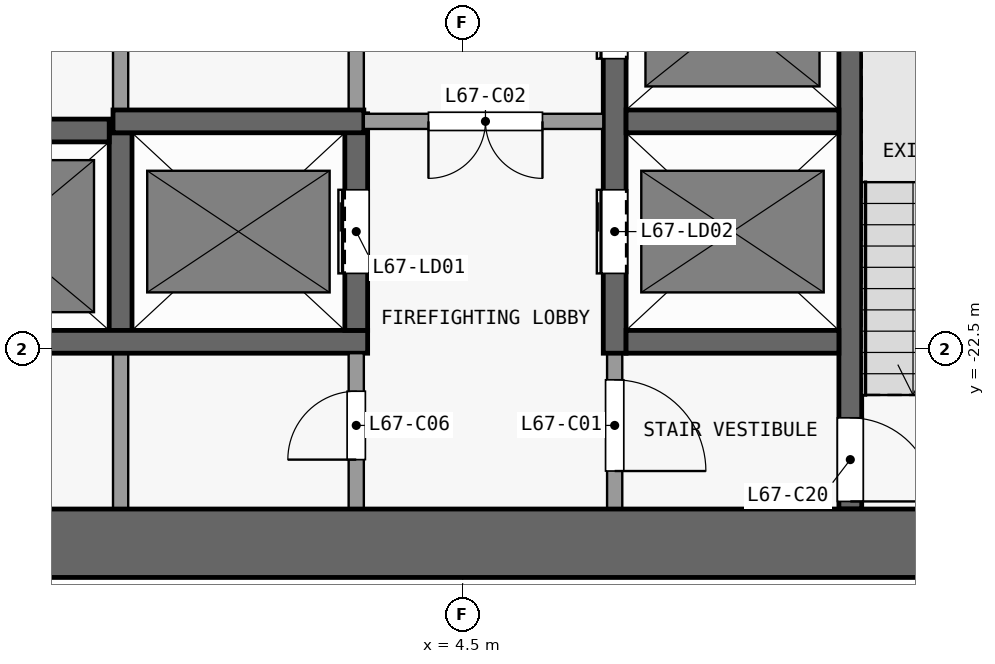
"""IFC4 building model, lengths in metres.
Left out: names, types, materials, properties, quantities, classifications, styles, units other than length and angle.
Written with IfcOpenShell. Run it as: python <this file> out.ifc"""

import sys

from ifc_helpers import new_model, si_unit, direction, frame, frame_2d, origin, place, context, subcontext, project, spatial, rectangle, extrude, element, fill, save


model = new_model("IFC4")
c1 = context("Model", 3, precision=1e-05, world=origin(), true_north=direction((0.0, 1.0)))
c2 = subcontext(c1, "Body", "Model", "MODEL_VIEW")
j1 = project(units=[si_unit("LENGTHUNIT", "METRE"), si_unit("PLANEANGLEUNIT", "RADIAN")], contexts=[c1])
p1 = place(None, origin())
s1 = spatial("IfcSite", under=j1, at=p1, CompositionType="ELEMENT")
p2 = place(p1, origin())
s2 = spatial("IfcBuilding", under=s1, at=p2, CompositionType="ELEMENT")
p3 = place(p2, frame((0.0, 0.0, 266.3)))
s3 = spatial("IfcBuildingStorey", under=s2, at=p3, CompositionType="ELEMENT", Elevation=266.3)
p4 = place(p3, frame((-13.1, -25.05, 0.0), z_axis=(0.0, 0.0, 1.0), x_axis=(1.0, 0.0, 0.0)))
e1 = element("IfcWall", 1, at=p4, inside=s3, PredefinedType="SHEAR", context=c2, shape_type="SweptSolid", body=[
    extrude(rectangle(XDim=26.2, YDim=0.9, at=frame_2d((13.1, 0.0))), origin(), (0.0, 0.0, 1.0), 3.3),
])
p5 = place(p3, frame((-3.25, -22.4, 0.0), z_axis=(0.0, 0.0, 1.0), x_axis=(1.0, 0.0, 0.0)))
e2 = element("IfcWall", 2, at=p5, inside=s3, PredefinedType="SHEAR", context=c2, shape_type="SweptSolid", body=[
    extrude(rectangle(XDim=6.5, YDim=0.3, at=frame_2d((3.25, 0.0))), origin(), (0.0, 0.0, 1.0), 3.3),
])
p6 = place(p3, frame((6.65, -22.4, 0.0), z_axis=(0.0, 0.0, 1.0), x_axis=(1.0, 0.0, 0.0)))
e3 = element("IfcWall", 3, at=p6, inside=s3, PredefinedType="SHEAR", context=c2, shape_type="SweptSolid", body=[
    extrude(rectangle(XDim=2.8, YDim=0.3, at=frame_2d((1.4, 0.0))), origin(), (0.0, 0.0, 1.0), 3.3),
])
p7 = place(p3, frame((-3.175, -19.62, 0.0), z_axis=(0.0, 0.0, 1.0), x_axis=(1.0, 0.0, 0.0)))
e4 = element("IfcWall", 4, at=p7, inside=s3, PredefinedType="SHEAR", context=c2, shape_type="SweptSolid", body=[
    extrude(rectangle(XDim=3.025, YDim=0.3, at=frame_2d((1.513, 0.0))), origin(), (0.0, 0.0, 1.0), 3.3),
])
p8 = place(p3, frame((-0.1, -19.5, 0.0), z_axis=(0.0, 0.0, 1.0), x_axis=(1.0, 0.0, 0.0)))
e5 = element("IfcWall", 5, at=p8, inside=s3, PredefinedType="SHEAR", context=c2, shape_type="SweptSolid", body=[
    extrude(rectangle(XDim=3.3, YDim=0.3, at=frame_2d((1.65, 0.0))), origin(), (0.0, 0.0, 1.0), 3.3),
])
p9 = place(p3, frame((6.35, -19.5, 0.0), z_axis=(0.0, 0.0, 1.0), x_axis=(-1.0, 0.0, 0.0)))
e6 = element("IfcWall", 6, at=p9, inside=s3, PredefinedType="PARTITIONING", context=c2, shape_type="SweptSolid", body=[
    extrude(rectangle(XDim=3.15, YDim=0.2, at=frame_2d((1.575, 0.0))), origin(), (0.0, 0.0, 1.0), 3.3),
])
p10 = place(p9, frame((0.8, 0.0, 0.0)))
e7 = element("IfcOpeningElement", 7, at=p10, cuts=e6, PredefinedType="OPENING", context=c2, shape_type="SweptSolid", body=[
    extrude(rectangle(XDim=1.5, YDim=2.1, at=frame_2d((0.75, 1.05))), frame((0.0, 0.11, 0.0), z_axis=(0.0, -1.0, 0.0), x_axis=(1.0, 0.0, 0.0)), (0.0, 0.0, 1.0), 0.22),
])
p11 = place(p3, frame((6.65, -19.5, 0.0), z_axis=(0.0, 0.0, 1.0), x_axis=(1.0, 0.0, 0.0)))
e8 = element("IfcWall", 8, at=p11, inside=s3, PredefinedType="SHEAR", context=c2, shape_type="SweptSolid", body=[
    extrude(rectangle(XDim=2.8, YDim=0.3, at=frame_2d((1.4, 0.0))), origin(), (0.0, 0.0, 1.0), 3.3),
])
p12 = place(p3, frame((0.0, -24.6, 0.0), z_axis=(0.0, 0.0, 1.0), x_axis=(0.0, 1.0, 0.0)))
e9 = element("IfcWall", 9, at=p12, inside=s3, PredefinedType="PARTITIONING", context=c2, shape_type="SweptSolid", body=[
    extrude(rectangle(XDim=2.05, YDim=0.2, at=frame_2d((1.025, 0.0))), origin(), (0.0, 0.0, 1.0), 3.3),
])
p13 = place(p3, frame((0.0, -22.25, 0.0), z_axis=(0.0, 0.0, 1.0), x_axis=(0.0, 1.0, 0.0)))
e10 = element("IfcWall", 10, at=p13, inside=s3, PredefinedType="SHEAR", context=c2, shape_type="SweptSolid", body=[
    extrude(rectangle(XDim=2.6, YDim=0.3, at=frame_2d((1.3, 0.0))), origin(), (0.0, 0.0, 1.0), 3.3),
])
p14 = place(p3, frame((0.0, -19.35, 0.0), z_axis=(0.0, 0.0, 1.0), x_axis=(0.0, 1.0, 0.0)))
e11 = element("IfcWall", 11, at=p14, inside=s3, PredefinedType="PARTITIONING", context=c2, shape_type="SweptSolid", body=[
    extrude(rectangle(XDim=8.2, YDim=0.2, at=frame_2d((4.1, 0.0))), origin(), (0.0, 0.0, 1.0), 3.3),
])
p15 = place(p3, frame((3.1, -24.6, 0.0), z_axis=(0.0, 0.0, 1.0), x_axis=(0.0, 1.0, 0.0)))
e12 = element("IfcWall", 12, at=p15, inside=s3, PredefinedType="PARTITIONING", context=c2, shape_type="SweptSolid", body=[
    extrude(rectangle(XDim=2.05, YDim=0.2, at=frame_2d((1.025, 0.0))), origin(), (0.0, 0.0, 1.0), 3.3),
])
p16 = place(p15, frame((0.65, 0.0, 0.0)))
e13 = element("IfcOpeningElement", 13, at=p16, cuts=e12, PredefinedType="OPENING", context=c2, shape_type="SweptSolid", body=[
    extrude(rectangle(XDim=0.9, YDim=2.1, at=frame_2d((0.45, 1.05))), frame((0.0, 0.11, 0.0), z_axis=(0.0, -1.0, 0.0), x_axis=(1.0, 0.0, 0.0)), (0.0, 0.0, 1.0), 0.22),
])
p17 = place(p3, frame((3.1, -22.25, 0.0), z_axis=(0.0, 0.0, 1.0), x_axis=(0.0, 1.0, 0.0)))
e14 = element("IfcWall", 14, at=p17, inside=s3, PredefinedType="SHEAR", context=c2, shape_type="SweptSolid", body=[
    extrude(rectangle(XDim=2.85, YDim=0.3, at=frame_2d((1.425, 0.0))), origin(), (0.0, 0.0, 1.0), 3.3),
])
p18 = place(p17, frame((0.75, 0.0, 0.0)))
e15 = element("IfcOpeningElement", 15, at=p18, cuts=e14, PredefinedType="OPENING", context=c2, shape_type="SweptSolid", body=[
    extrude(rectangle(XDim=1.1, YDim=2.1, at=frame_2d((0.55, 1.05))), frame((0.0, 0.16, 0.0), z_axis=(0.0, -1.0, 0.0), x_axis=(1.0, 0.0, 0.0)), (0.0, 0.0, 1.0), 0.32),
])
p19 = place(p3, frame((3.1, -19.6, 0.0), z_axis=(0.0, 0.0, 1.0), x_axis=(0.0, 1.0, 0.0)))
e16 = element("IfcWall", 16, at=p19, inside=s3, PredefinedType="PARTITIONING", context=c2, shape_type="SweptSolid", body=[
    extrude(rectangle(XDim=8.45, YDim=0.2, at=frame_2d((4.225, 0.0))), origin(), (0.0, 0.0, 1.0), 3.3),
])
p20 = place(p19, frame((3.625, 0.0, 0.0)))
e17 = element("IfcOpeningElement", 17, at=p20, cuts=e16, PredefinedType="OPENING", context=c2, shape_type="SweptSolid", body=[
    extrude(rectangle(XDim=1.2, YDim=2.1, at=frame_2d((0.6, 1.05))), frame((0.0, 0.11, 0.0), z_axis=(0.0, -1.0, 0.0), x_axis=(1.0, 0.0, 0.0)), (0.0, 0.0, 1.0), 0.22),
])
p21 = place(p3, frame((6.5, -22.55, 0.0), z_axis=(0.0, 0.0, 1.0), x_axis=(0.0, -1.0, 0.0)))
e18 = element("IfcWall", 18, at=p21, inside=s3, PredefinedType="PARTITIONING", context=c2, shape_type="SweptSolid", body=[
    extrude(rectangle(XDim=2.05, YDim=0.2, at=frame_2d((1.025, 0.0))), origin(), (0.0, 0.0, 1.0), 3.3),
])
p22 = place(p21, frame((0.35, 0.0, 0.0)))
e19 = element("IfcOpeningElement", 19, at=p22, cuts=e18, PredefinedType="OPENING", context=c2, shape_type="SweptSolid", body=[
    extrude(rectangle(XDim=1.2, YDim=2.1, at=frame_2d((0.6, 1.05))), frame((0.0, 0.11, 0.0), z_axis=(0.0, -1.0, 0.0), x_axis=(1.0, 0.0, 0.0)), (0.0, 0.0, 1.0), 0.22),
])
p23 = place(p3, frame((6.5, -22.55, 0.0), z_axis=(0.0, 0.0, 1.0), x_axis=(0.0, 1.0, 0.0)))
e20 = element("IfcWall", 20, at=p23, inside=s3, PredefinedType="SHEAR", context=c2, shape_type="SweptSolid", body=[
    extrude(rectangle(XDim=14.05, YDim=0.3, at=frame_2d((7.025, 0.0))), origin(), (0.0, 0.0, 1.0), 3.3),
])
p24 = place(p23, frame((1.05, 0.0, 0.0)))
e21 = element("IfcOpeningElement", 21, at=p24, cuts=e20, PredefinedType="OPENING", context=c2, shape_type="SweptSolid", body=[
    extrude(rectangle(XDim=1.1, YDim=2.1, at=frame_2d((0.55, 1.05))), frame((0.0, 0.16, 0.0), z_axis=(0.0, -1.0, 0.0), x_axis=(1.0, 0.0, 0.0)), (0.0, 0.0, 1.0), 0.32),
])
p25 = place(p23, frame((3.875, 0.0, 0.0)))
e22 = element("IfcOpeningElement", 22, at=p25, cuts=e20, PredefinedType="OPENING", context=c2, shape_type="SweptSolid", body=[
    extrude(rectangle(XDim=1.1, YDim=2.1, at=frame_2d((0.55, 1.05))), frame((0.0, 0.16, 0.0), z_axis=(0.0, -1.0, 0.0), x_axis=(1.0, 0.0, 0.0)), (0.0, 0.0, 1.0), 0.32),
])
p26 = place(p23, frame((6.625, 0.0, 0.0)))
e23 = element("IfcOpeningElement", 23, at=p26, cuts=e20, PredefinedType="OPENING", context=c2, shape_type="SweptSolid", body=[
    extrude(rectangle(XDim=1.1, YDim=2.1, at=frame_2d((0.55, 1.05))), frame((0.0, 0.16, 0.0), z_axis=(0.0, -1.0, 0.0), x_axis=(1.0, 0.0, 0.0)), (0.0, 0.0, 1.0), 0.32),
])
p27 = place(p23, frame((9.375, 0.0, 0.0)))
e24 = element("IfcOpeningElement", 24, at=p27, cuts=e20, PredefinedType="OPENING", context=c2, shape_type="SweptSolid", body=[
    extrude(rectangle(XDim=1.1, YDim=2.1, at=frame_2d((0.55, 1.05))), frame((0.0, 0.16, 0.0), z_axis=(0.0, -1.0, 0.0), x_axis=(1.0, 0.0, 0.0)), (0.0, 0.0, 1.0), 0.32),
])
p28 = place(p23, frame((12.125, 0.0, 0.0)))
e25 = element("IfcOpeningElement", 25, at=p28, cuts=e20, PredefinedType="OPENING", context=c2, shape_type="SweptSolid", body=[
    extrude(rectangle(XDim=1.1, YDim=2.1, at=frame_2d((0.55, 1.05))), frame((0.0, 0.16, 0.0), z_axis=(0.0, -1.0, 0.0), x_axis=(1.0, 0.0, 0.0)), (0.0, 0.0, 1.0), 0.32),
])
p29 = place(p3, frame((9.6, -16.9, 0.0), z_axis=(0.0, 0.0, 1.0), x_axis=(0.0, -1.0, 0.0)))
e26 = element("IfcWall", 26, at=p29, inside=s3, PredefinedType="SHEAR", context=c2, shape_type="SweptSolid", body=[
    extrude(rectangle(XDim=7.7, YDim=0.3, at=frame_2d((3.85, 0.0))), origin(), (0.0, 0.0, 1.0), 3.3),
])
p30 = place(p29, frame((6.5, 0.0, 0.0)))
e27 = element("IfcOpeningElement", 27, at=p30, cuts=e26, PredefinedType="OPENING", context=c2, shape_type="SweptSolid", body=[
    extrude(rectangle(XDim=1.1, YDim=2.1, at=frame_2d((0.55, 1.05))), frame((0.0, 0.16, 0.0), z_axis=(0.0, -1.0, 0.0), x_axis=(1.0, 0.0, 0.0)), (0.0, 0.0, 1.0), 0.32),
])
p31 = place(p18, origin())
e28 = element("IfcDoor", 28, at=p31, inside=s3, OperationType="DOUBLE_DOOR_SLIDING", PredefinedType="DOOR", context=c2, shape_type="SweptSolid", body=[
    extrude(rectangle(XDim=1.1, YDim=2.1, at=frame_2d((0.55, 1.05))), frame((0.0, 0.025, 0.0), z_axis=(0.0, -1.0, 0.0), x_axis=(1.0, 0.0, 0.0)), (0.0, 0.0, 1.0), 0.05),
])
fill(e15, e28)
p32 = place(p24, origin())
e29 = element("IfcDoor", 29, at=p32, inside=s3, OperationType="DOUBLE_DOOR_SLIDING", PredefinedType="DOOR", context=c2, shape_type="SweptSolid", body=[
    extrude(rectangle(XDim=1.1, YDim=2.1, at=frame_2d((0.55, 1.05))), frame((0.0, 0.025, 0.0), z_axis=(0.0, -1.0, 0.0), x_axis=(1.0, 0.0, 0.0)), (0.0, 0.0, 1.0), 0.05),
])
fill(e21, e29)
p33 = place(p25, origin())
e30 = element("IfcDoor", 30, at=p33, inside=s3, OperationType="DOUBLE_DOOR_SLIDING", PredefinedType="DOOR", context=c2, shape_type="SweptSolid", body=[
    extrude(rectangle(XDim=1.1, YDim=2.1, at=frame_2d((0.55, 1.05))), frame((0.0, 0.025, 0.0), z_axis=(0.0, -1.0, 0.0), x_axis=(1.0, 0.0, 0.0)), (0.0, 0.0, 1.0), 0.05),
])
fill(e22, e30)
p34 = place(p22, origin())
e31 = element("IfcDoor", 31, at=p34, inside=s3, OperationType="SINGLE_SWING_RIGHT", PredefinedType="DOOR", context=c2, shape_type="SweptSolid", body=[
    extrude(rectangle(XDim=1.2, YDim=2.1, at=frame_2d((0.6, 1.05))), frame((0.0, 0.025, 0.0), z_axis=(0.0, -1.0, 0.0), x_axis=(1.0, 0.0, 0.0)), (0.0, 0.0, 1.0), 0.05),
])
fill(e19, e31)
p35 = place(p10, origin())
e32 = element("IfcDoor", 32, at=p35, inside=s3, OperationType="DOUBLE_DOOR_SINGLE_SWING", PredefinedType="DOOR", context=c2, shape_type="SweptSolid", body=[
    extrude(rectangle(XDim=1.5, YDim=2.1, at=frame_2d((0.75, 1.05))), frame((0.0, 0.025, 0.0), z_axis=(0.0, -1.0, 0.0), x_axis=(1.0, 0.0, 0.0)), (0.0, 0.0, 1.0), 0.05),
])
fill(e7, e32)
p36 = place(p16, origin())
e33 = element("IfcDoor", 33, at=p36, inside=s3, OperationType="SINGLE_SWING_LEFT", PredefinedType="DOOR", context=c2, shape_type="SweptSolid", body=[
    extrude(rectangle(XDim=0.9, YDim=2.1, at=frame_2d((0.45, 1.05))), frame((0.0, 0.025, 0.0), z_axis=(0.0, -1.0, 0.0), x_axis=(1.0, 0.0, 0.0)), (0.0, 0.0, 1.0), 0.05),
])
fill(e13, e33)
p37 = place(p30, origin())
e34 = element("IfcDoor", 34, at=p37, inside=s3, OperationType="SINGLE_SWING_RIGHT", PredefinedType="DOOR", context=c2, shape_type="SweptSolid", body=[
    extrude(rectangle(XDim=1.1, YDim=2.1, at=frame_2d((0.55, 1.05))), frame((0.0, 0.025, 0.0), z_axis=(0.0, -1.0, 0.0), x_axis=(1.0, 0.0, 0.0)), (0.0, 0.0, 1.0), 0.05),
])
fill(e27, e34)
save(model, sys.argv[1])
